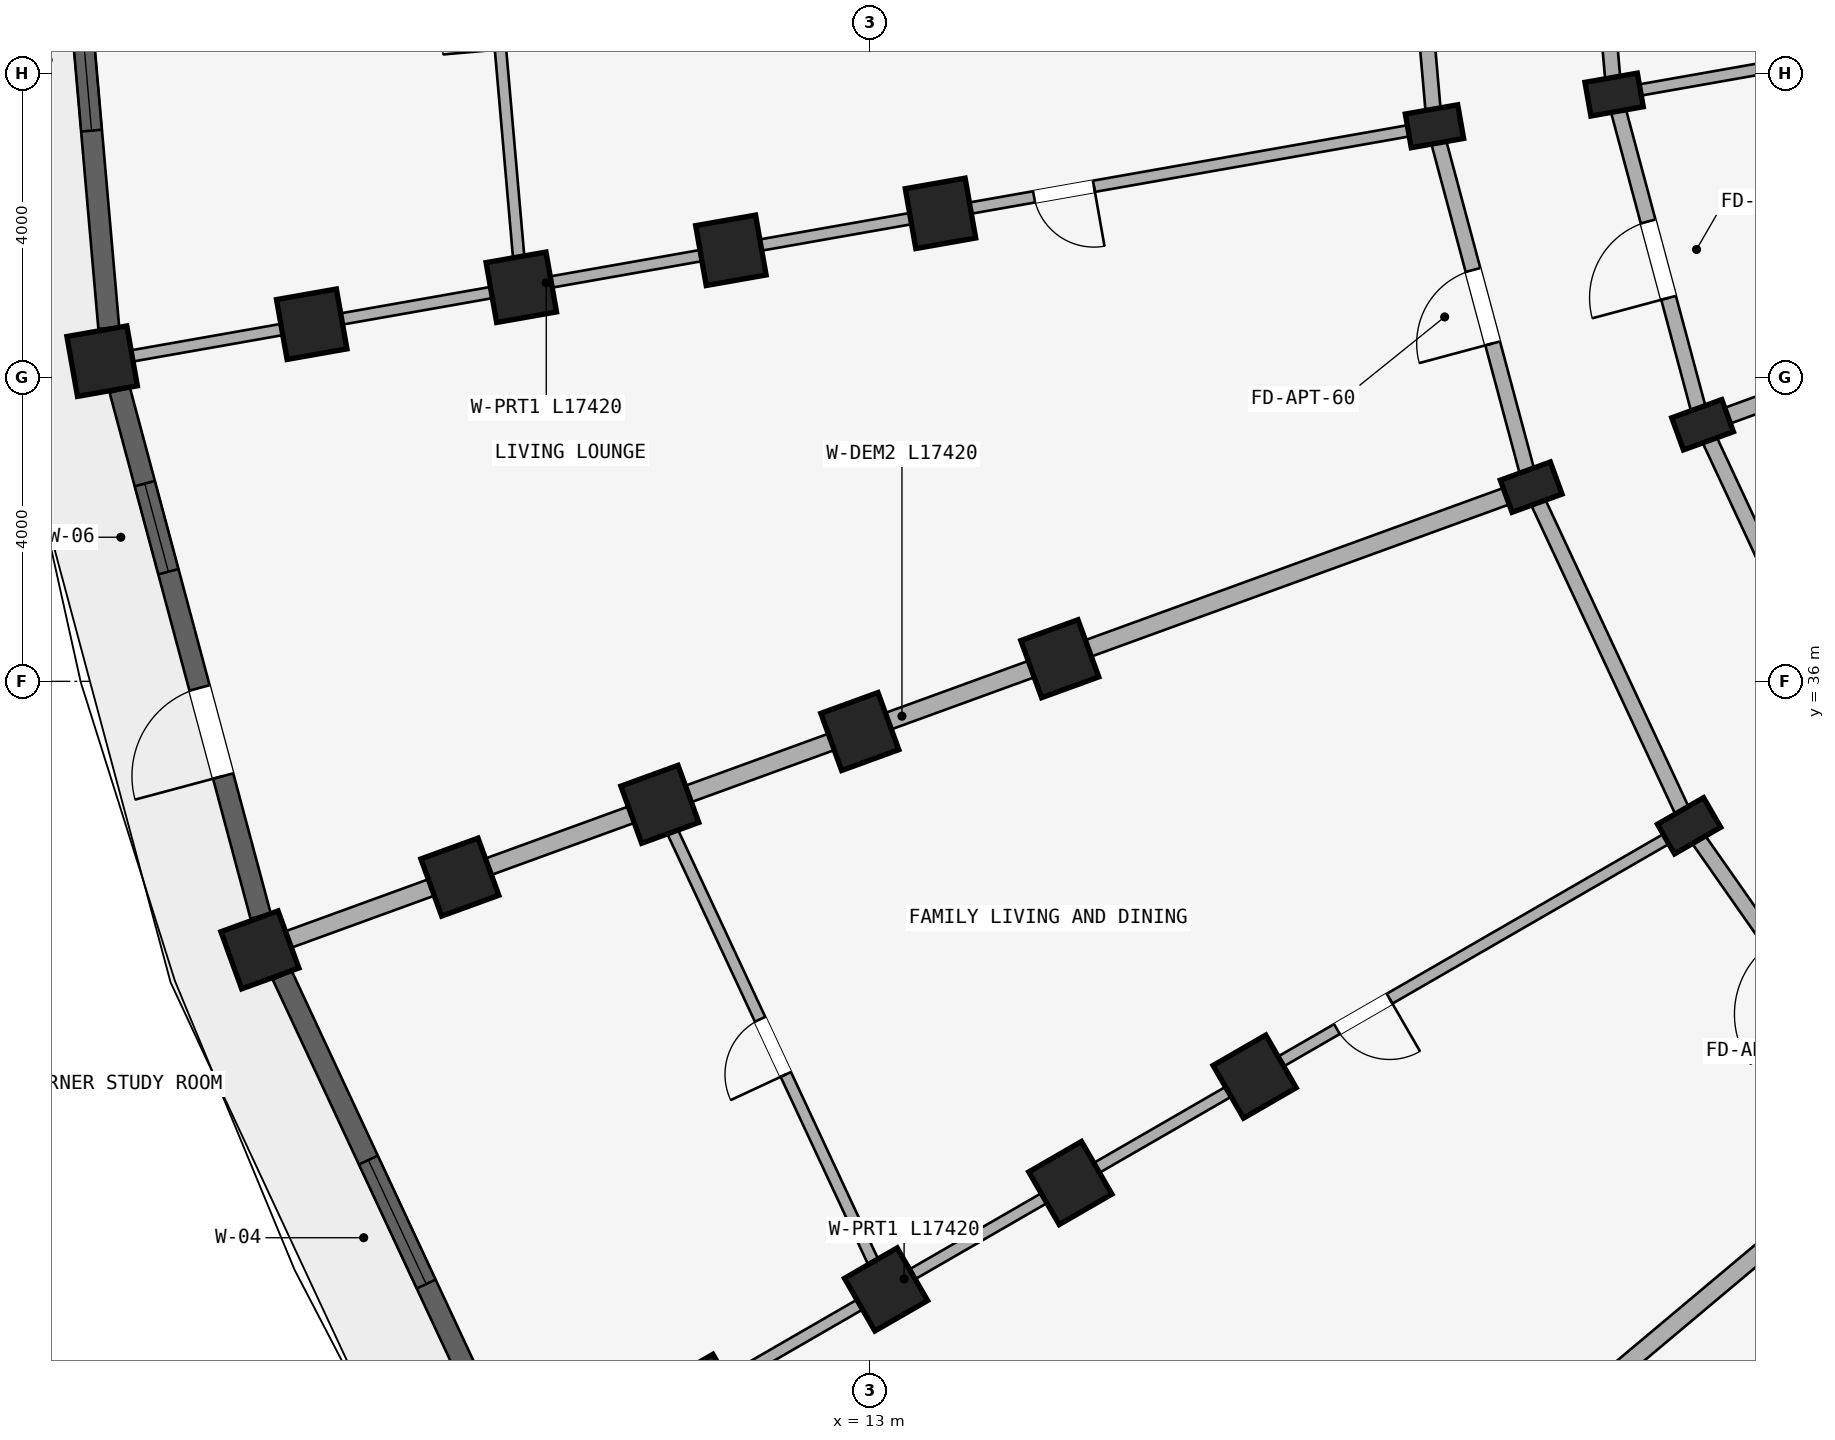
"""IFC4 building model, lengths in metres.
Left out: names, types, materials, properties, quantities, classifications, styles, units other than length and angle.
Written with IfcOpenShell. Run it as: python <this file> out.ifc"""

import sys

from ifc_helpers import new_model, si_unit, direction, frame, frame_2d, origin, origin_2d, place, context, subcontext, project, spatial, rectangle, extrude, element, fill, save


model = new_model("IFC4")
c1 = context("Model", 3, precision=1e-05, world=origin(), true_north=direction((0.0, 1.0)))
c2 = subcontext(c1, "Body", "Model", "MODEL_VIEW")
j1 = project(units=[si_unit("LENGTHUNIT", "METRE"), si_unit("PLANEANGLEUNIT", "RADIAN")], contexts=[c1])
p1 = place(None, origin())
s1 = spatial("IfcSite", under=j1, at=p1, CompositionType="ELEMENT")
p2 = place(p1, origin())
s2 = spatial("IfcBuilding", under=s1, at=p2, CompositionType="ELEMENT")
p3 = place(p2, frame((0.0, 0.0, 11.85)))
s3 = spatial("IfcBuildingStorey", under=s2, at=p3, CompositionType="ELEMENT", Elevation=11.85)
p4 = place(p3, frame((23.778, 34.1, 0.0), z_axis=(0.0, 0.0, 1.0), x_axis=(-0.5, 0.866025403784, 0.0)))
e1 = element("IfcColumn", 1, at=p4, inside=s3, PredefinedType="COLUMN", context=c2, shape_type="SweptSolid", body=[
    extrude(rectangle(XDim=0.45, YDim=0.7, at=origin_2d()), origin(), (0.0, 0.0, 1.0), 2.93),
])
for number, where, z_axis, x_axis in (
    (2, (18.062, 30.8, 0.0), (0.0, 0.0, 1.0), (-0.5, 0.866, 0.0)),
    (3, (15.637, 29.4, 0.0), (0.0, 0.0, 1.0), (-0.5, 0.866, 0.0)),
    (4, (13.213, 28.0, 0.0), (0.0, 0.0, 1.0), (-0.5, 0.866, 0.0)),
    (5, (10.788, 26.6, 0.0), (0.0, 0.0, 1.0), (-0.5, 0.866, 0.0)),
):
    element("IfcColumn", number, at=place(p3, frame(where, z_axis=z_axis, x_axis=x_axis)), inside=s3, PredefinedType="COLUMN", context=c2, shape_type="SweptSolid", body=[
        extrude(rectangle(XDim=0.8, YDim=0.8, at=origin_2d()), origin(), (0.0, 0.0, 1.0), 2.93),
    ])
for number, where, z_axis, x_axis in (
    (6, (23.956, 39.376, 0.0), (0.0, 0.0, 1.0), (-0.342, 0.94, 0.0)),
    (7, (21.701, 38.555, 0.0), (0.0, 0.0, 1.0), (-0.342, 0.94, 0.0)),
):
    element("IfcColumn", number, at=place(p3, frame(where, z_axis=z_axis, x_axis=x_axis)), inside=s3, PredefinedType="COLUMN", context=c2, shape_type="SweptSolid", body=[
        extrude(rectangle(XDim=0.45, YDim=0.7, at=origin_2d()), origin(), (0.0, 0.0, 1.0), 2.93),
    ])
for number, where, z_axis, x_axis in (
    (8, (15.499, 36.298, 0.0), (0.0, 0.0, 1.0), (-0.342, 0.94, 0.0)),
    (9, (12.868, 35.34, 0.0), (0.0, 0.0, 1.0), (-0.342, 0.94, 0.0)),
    (10, (10.236, 34.382, 0.0), (0.0, 0.0, 1.0), (-0.342, 0.94, 0.0)),
    (11, (7.605, 33.425, 0.0), (0.0, 0.0, 1.0), (-0.342, 0.94, 0.0)),
    (12, (4.974, 32.467, 0.0), (0.0, 0.0, 1.0), (-0.342, 0.94, 0.0)),
):
    element("IfcColumn", number, at=place(p3, frame(where, z_axis=z_axis, x_axis=x_axis)), inside=s3, PredefinedType="COLUMN", context=c2, shape_type="SweptSolid", body=[
        extrude(rectangle(XDim=0.8, YDim=0.8, at=origin_2d()), origin(), (0.0, 0.0, 1.0), 2.93),
    ])
for number, where, z_axis, x_axis in (
    (13, (22.792, 43.72, 0.0), (0.0, 0.0, 1.0), (-0.174, 0.985, 0.0)),
    (14, (20.428, 43.303, 0.0), (0.0, 0.0, 1.0), (-0.174, 0.985, 0.0)),
):
    element("IfcColumn", number, at=place(p3, frame(where, z_axis=z_axis, x_axis=x_axis)), inside=s3, PredefinedType="COLUMN", context=c2, shape_type="SweptSolid", body=[
        extrude(rectangle(XDim=0.45, YDim=0.7, at=origin_2d()), origin(), (0.0, 0.0, 1.0), 2.93),
    ])
for number, where, z_axis, x_axis in (
    (15, (13.929, 42.157, 0.0), (0.0, 0.0, 1.0), (-0.174, 0.985, 0.0)),
    (16, (11.171, 41.671, 0.0), (0.0, 0.0, 1.0), (-0.174, 0.985, 0.0)),
    (17, (8.414, 41.185, 0.0), (0.0, 0.0, 1.0), (-0.174, 0.985, 0.0)),
    (18, (5.656, 40.698, 0.0), (0.0, 0.0, 1.0), (-0.174, 0.985, 0.0)),
    (19, (2.899, 40.212, 0.0), (0.0, 0.0, 1.0), (-0.174, 0.985, 0.0)),
):
    element("IfcColumn", number, at=place(p3, frame(where, z_axis=z_axis, x_axis=x_axis)), inside=s3, PredefinedType="COLUMN", context=c2, shape_type="SweptSolid", body=[
        extrude(rectangle(XDim=0.8, YDim=0.8, at=origin_2d()), origin(), (0.0, 0.0, 1.0), 2.93),
    ])
p5 = place(p3, frame((26.598, 30.073, 0.0), z_axis=(0.0, 0.0, 1.0), x_axis=(-0.573592335331, 0.819140911474, 0.0)))
e20 = element("IfcWall", 20, at=p5, inside=s3, PredefinedType="STANDARD", context=c2, shape_type="SweptSolid", body=[
    extrude(rectangle(XDim=4.916, YDim=0.2, at=frame_2d((2.458, 0.0))), origin(), (0.0, 0.0, 1.0), 2.372),
])
p6 = place(p5, frame((1.888, 0.0, 0.0)))
e21 = element("IfcOpeningElement", 21, at=p6, cuts=e20, PredefinedType="OPENING", context=c2, shape_type="SweptSolid", body=[
    extrude(rectangle(XDim=1.14, YDim=2.15, at=frame_2d((0.57, 1.075))), frame((0.0, 0.11, 0.0), z_axis=(0.0, -1.0, 0.0), x_axis=(1.0, 0.0, 0.0)), (0.0, 0.0, 1.0), 0.22),
])
p7 = place(p3, frame((25.856, 35.3, 0.0), z_axis=(0.0, 0.0, 1.0), x_axis=(-0.422617978463, 0.906307919131, 0.0)))
e22 = element("IfcWall", 22, at=p7, inside=s3, PredefinedType="STANDARD", context=c2, shape_type="SweptSolid", body=[
    extrude(rectangle(XDim=4.497, YDim=0.2, at=frame_2d((2.249, 0.0))), origin(), (0.0, 0.0, 1.0), 2.372),
])
p8 = place(p3, frame((23.778, 34.1, 0.0), z_axis=(0.0, 0.0, 1.0), x_axis=(-0.422629854778, 0.906302381024, 0.0)))
e23 = element("IfcWall", 23, at=p8, inside=s3, PredefinedType="STANDARD", context=c2, shape_type="SweptSolid", body=[
    extrude(rectangle(XDim=4.915, YDim=0.2, at=frame_2d((2.458, 0.0))), origin(), (0.0, 0.0, 1.0), 2.372),
])
p9 = place(p3, frame((23.956, 39.376, 0.0), z_axis=(0.0, 0.0, 1.0), x_axis=(-0.258787642463, 0.965934240054, 0.0)))
e24 = element("IfcWall", 24, at=p9, inside=s3, PredefinedType="STANDARD", context=c2, shape_type="SweptSolid", body=[
    extrude(rectangle(XDim=4.497, YDim=0.2, at=frame_2d((2.249, 0.0))), origin(), (0.0, 0.0, 1.0), 2.372),
])
p10 = place(p9, frame((1.729, 0.0, 0.0)))
e25 = element("IfcOpeningElement", 25, at=p10, cuts=e24, PredefinedType="OPENING", context=c2, shape_type="SweptSolid", body=[
    extrude(rectangle(XDim=1.04, YDim=2.15, at=frame_2d((0.52, 1.075))), frame((0.0, 0.11, 0.0), z_axis=(0.0, -1.0, 0.0), x_axis=(1.0, 0.0, 0.0)), (0.0, 0.0, 1.0), 0.22),
])
p11 = place(p3, frame((21.701, 38.555, 0.0), z_axis=(0.0, 0.0, 1.0), x_axis=(-0.258803112091, 0.965930095386, 0.0)))
e26 = element("IfcWall", 26, at=p11, inside=s3, PredefinedType="STANDARD", context=c2, shape_type="SweptSolid", body=[
    extrude(rectangle(XDim=4.916, YDim=0.2, at=frame_2d((2.458, 0.0))), origin(), (0.0, 0.0, 1.0), 2.372),
])
p12 = place(p11, frame((1.958, 0.0, 0.0)))
e27 = element("IfcOpeningElement", 27, at=p12, cuts=e26, PredefinedType="OPENING", context=c2, shape_type="SweptSolid", body=[
    extrude(rectangle(XDim=1.0, YDim=2.15, at=frame_2d((0.5, 1.075))), frame((0.0, 0.11, 0.0), z_axis=(0.0, -1.0, 0.0), x_axis=(1.0, 0.0, 0.0)), (0.0, 0.0, 1.0), 0.22),
])
p13 = place(p3, frame((22.792, 43.72, 0.0), z_axis=(0.0, 0.0, 1.0), x_axis=(-0.087187153726, 0.996191949488, 0.0)))
e28 = element("IfcWall", 28, at=p13, inside=s3, PredefinedType="STANDARD", context=c2, shape_type="SweptSolid", body=[
    extrude(rectangle(XDim=4.497, YDim=0.2, at=frame_2d((2.249, 0.0))), origin(), (0.0, 0.0, 1.0), 2.372),
])
p14 = place(p3, frame((20.428, 43.303, 0.0), z_axis=(0.0, 0.0, 1.0), x_axis=(-0.087167566415, 0.996193663584, 0.0)))
e29 = element("IfcWall", 29, at=p14, inside=s3, PredefinedType="STANDARD", context=c2, shape_type="SweptSolid", body=[
    extrude(rectangle(XDim=4.916, YDim=0.2, at=frame_2d((2.458, 0.0))), origin(), (0.0, 0.0, 1.0), 2.372),
])
p15 = place(p3, frame((26.521, 30.009, 0.0), z_axis=(0.0, 0.0, 1.0), x_axis=(-0.766046835987, -0.642784757967, 0.0)))
e30 = element("IfcWall", 30, at=p15, inside=s3, PredefinedType="STANDARD", context=c2, shape_type="SweptSolid", body=[
    extrude(rectangle(XDim=17.42, YDim=0.23, at=frame_2d((8.71, 0.0))), origin(), (0.0, 0.0, 1.0), 2.372),
])
p16 = place(p3, frame((23.691, 34.05, 0.0), z_axis=(0.0, 0.0, 1.0), x_axis=(-0.866026648973, -0.499997843263, 0.0)))
e31 = element("IfcWall", 31, at=p16, inside=s3, PredefinedType="PARTITIONING", context=c2, shape_type="SweptSolid", body=[
    extrude(rectangle(XDim=17.42, YDim=0.15, at=frame_2d((8.71, 0.0))), origin(), (0.0, 0.0, 1.0), 2.372),
])
p17 = place(p16, frame((4.45, 0.0, 0.0)))
e32 = element("IfcOpeningElement", 32, at=p17, cuts=e31, PredefinedType="OPENING", context=c2, shape_type="SweptSolid", body=[
    extrude(rectangle(XDim=0.8, YDim=2.1, at=frame_2d((0.4, 1.05))), frame((0.0, 0.085, 0.0), z_axis=(0.0, -1.0, 0.0), x_axis=(1.0, 0.0, 0.0)), (0.0, 0.0, 1.0), 0.17),
])
p18 = place(p3, frame((30.346, 41.702, 0.0), z_axis=(0.0, 0.0, 1.0), x_axis=(-0.939696231917, -0.342010221662, 0.0)))
e33 = element("IfcWall", 33, at=p18, inside=s3, PredefinedType="STANDARD", context=c2, shape_type="SweptSolid", body=[
    extrude(rectangle(XDim=6.75, YDim=0.22, at=frame_2d((3.375, 0.0))), origin(), (0.0, 0.0, 1.0), 2.372),
])
p19 = place(p3, frame((21.607, 38.521, 0.0), z_axis=(0.0, 0.0, 1.0), x_axis=(-0.939691901159, -0.342022120477, 0.0)))
e34 = element("IfcWall", 34, at=p19, inside=s3, PredefinedType="STANDARD", context=c2, shape_type="SweptSolid", body=[
    extrude(rectangle(XDim=17.42, YDim=0.23, at=frame_2d((8.71, 0.0))), origin(), (0.0, 0.0, 1.0), 2.372),
])
p20 = place(p3, frame((29.489, 44.901, 0.0), z_axis=(0.0, 0.0, 1.0), x_axis=(-0.984807944945, -0.173647089161, 0.0)))
e35 = element("IfcWall", 35, at=p20, inside=s3, PredefinedType="PARTITIONING", context=c2, shape_type="SweptSolid", body=[
    extrude(rectangle(XDim=6.75, YDim=0.15, at=frame_2d((3.375, 0.0))), origin(), (0.0, 0.0, 1.0), 2.372),
])
p21 = place(p20, frame((3.262, 0.0, 0.0)))
e36 = element("IfcOpeningElement", 36, at=p21, cuts=e35, PredefinedType="OPENING", context=c2, shape_type="SweptSolid", body=[
    extrude(rectangle(XDim=0.9, YDim=2.1, at=frame_2d((0.45, 1.05))), frame((0.0, 0.085, 0.0), z_axis=(0.0, -1.0, 0.0), x_axis=(1.0, 0.0, 0.0)), (0.0, 0.0, 1.0), 0.17),
])
p22 = place(p3, frame((20.33, 43.286, 0.0), z_axis=(0.0, 0.0, 1.0), x_axis=(-0.984808098809, -0.173646216546, 0.0)))
e37 = element("IfcWall", 37, at=p22, inside=s3, PredefinedType="PARTITIONING", context=c2, shape_type="SweptSolid", body=[
    extrude(rectangle(XDim=17.42, YDim=0.15, at=frame_2d((8.71, 0.0))), origin(), (0.0, 0.0, 1.0), 2.372),
])
p23 = place(p22, frame((4.45, 0.0, 0.0)))
e38 = element("IfcOpeningElement", 38, at=p23, cuts=e37, PredefinedType="OPENING", context=c2, shape_type="SweptSolid", body=[
    extrude(rectangle(XDim=0.8, YDim=2.1, at=frame_2d((0.4, 1.05))), frame((0.0, 0.085, 0.0), z_axis=(0.0, -1.0, 0.0), x_axis=(1.0, 0.0, 0.0)), (0.0, 0.0, 1.0), 0.17),
])
p24 = place(p3, frame((13.213, 28.0, 0.0), z_axis=(0.0, 0.0, 1.0), x_axis=(-0.422640621205, 0.906297360311, 0.0)))
e39 = element("IfcWall", 39, at=p24, inside=s3, PredefinedType="PLUMBINGWALL", context=c2, shape_type="SweptSolid", body=[
    extrude(rectangle(XDim=7.042, YDim=0.15, at=frame_2d((3.521, 0.0))), origin(), (0.0, 0.0, 1.0), 2.372),
])
p25 = place(p24, frame((3.121, 0.0, 0.0)))
e40 = element("IfcOpeningElement", 40, at=p25, cuts=e39, PredefinedType="OPENING", context=c2, shape_type="SweptSolid", body=[
    extrude(rectangle(XDim=0.8, YDim=2.1, at=frame_2d((0.4, 1.05))), frame((0.0, 0.085, 0.0), z_axis=(0.0, -1.0, 0.0), x_axis=(1.0, 0.0, 0.0)), (0.0, 0.0, 1.0), 0.17),
])
p26 = place(p3, frame((8.414, 41.185, 0.0), z_axis=(0.0, 0.0, 1.0), x_axis=(-0.087156198737, 0.996194658198, 0.0)))
e41 = element("IfcWall", 41, at=p26, inside=s3, PredefinedType="PLUMBINGWALL", context=c2, shape_type="SweptSolid", body=[
    extrude(rectangle(XDim=7.042, YDim=0.15, at=frame_2d((3.521, 0.0))), origin(), (0.0, 0.0, 1.0), 2.372),
])
p27 = place(p26, frame((3.141, 0.0, 0.0)))
e42 = element("IfcOpeningElement", 42, at=p27, cuts=e41, PredefinedType="OPENING", context=c2, shape_type="SweptSolid", body=[
    extrude(rectangle(XDim=0.76, YDim=2.05, at=frame_2d((0.38, 1.025))), frame((0.0, 0.085, 0.0), z_axis=(0.0, -1.0, 0.0), x_axis=(1.0, 0.0, 0.0)), (0.0, 0.0, 1.0), 0.17),
])
p28 = place(p3, frame((8.296, 25.64, 0.0), z_axis=(0.0, 0.0, 1.0), x_axis=(-0.422633596215, 0.906300636296, 0.0)))
e43 = element("IfcWall", 43, at=p28, inside=s3, PredefinedType="STANDARD", context=c2, shape_type="SweptSolid", body=[
    extrude(rectangle(XDim=7.164, YDim=0.275, at=frame_2d((3.582, 0.0))), origin(), (0.0, 0.0, 1.0), 2.372),
])
p29 = place(p28, frame((2.682, 0.0, 0.522)))
e44 = element("IfcOpeningElement", 44, at=p29, cuts=e43, PredefinedType="OPENING", context=c2, shape_type="SweptSolid", body=[
    extrude(rectangle(XDim=1.8, YDim=1.65, at=frame_2d((0.9, 0.825))), frame((0.0, 0.147, 0.0), z_axis=(0.0, -1.0, 0.0), x_axis=(1.0, 0.0, 0.0)), (0.0, 0.0, 1.0), 0.295),
])
p30 = place(p3, frame((4.984, 32.912, 0.0), z_axis=(0.0, 0.0, 1.0), x_axis=(-0.258826933296, 0.965923712619, 0.0)))
e45 = element("IfcWall", 45, at=p30, inside=s3, PredefinedType="STANDARD", context=c2, shape_type="SweptSolid", body=[
    extrude(rectangle(XDim=7.164, YDim=0.275, at=frame_2d((3.582, 0.0))), origin(), (0.0, 0.0, 1.0), 2.372),
])
p31 = place(p30, frame((4.69, 0.0, 0.372)))
e46 = element("IfcOpeningElement", 46, at=p31, cuts=e45, PredefinedType="OPENING", context=c2, shape_type="SweptSolid", body=[
    extrude(rectangle(XDim=1.2, YDim=1.5, at=frame_2d((0.6, 0.75))), frame((0.0, 0.147, 0.0), z_axis=(0.0, -1.0, 0.0), x_axis=(1.0, 0.0, 0.0)), (0.0, 0.0, 1.0), 0.295),
])
p32 = place(p30, frame((1.907, 0.0, 0.0)))
e47 = element("IfcOpeningElement", 47, at=p32, cuts=e45, PredefinedType="OPENING", context=c2, shape_type="SweptSolid", body=[
    extrude(rectangle(XDim=1.2, YDim=2.15, at=frame_2d((0.6, 1.075))), frame((0.0, 0.147, 0.0), z_axis=(0.0, -1.0, 0.0), x_axis=(1.0, 0.0, 0.0)), (0.0, 0.0, 1.0), 0.295),
])
p33 = place(p3, frame((2.986, 40.649, 0.0), z_axis=(0.0, 0.0, 1.0), x_axis=(-0.08713989423, 0.99619608453, 0.0)))
e48 = element("IfcWall", 48, at=p33, inside=s3, PredefinedType="STANDARD", context=c2, shape_type="SweptSolid", body=[
    extrude(rectangle(XDim=7.164, YDim=0.275, at=frame_2d((3.582, 0.0))), origin(), (0.0, 0.0, 1.0), 2.372),
])
p34 = place(p33, frame((2.607, 0.0, 0.322)))
e49 = element("IfcOpeningElement", 49, at=p34, cuts=e48, PredefinedType="OPENING", context=c2, shape_type="SweptSolid", body=[
    extrude(rectangle(XDim=1.95, YDim=1.85, at=frame_2d((0.975, 0.925))), frame((0.0, 0.147, 0.0), z_axis=(0.0, -1.0, 0.0), x_axis=(1.0, 0.0, 0.0)), (0.0, 0.0, 1.0), 0.295),
])
p35 = place(p29, origin())
e50 = element("IfcWindow", 50, at=p35, inside=s3, PartitioningType="DOUBLE_PANEL_VERTICAL", PredefinedType="WINDOW", context=c2, shape_type="SweptSolid", body=[
    extrude(rectangle(XDim=1.8, YDim=1.65, at=frame_2d((0.9, 0.825))), frame((0.0, 0.03, 0.0), z_axis=(0.0, -1.0, 0.0), x_axis=(1.0, 0.0, 0.0)), (0.0, 0.0, 1.0), 0.06),
])
fill(e44, e50)
p36 = place(p31, origin())
e51 = element("IfcWindow", 51, at=p36, inside=s3, PartitioningType="SINGLE_PANEL", PredefinedType="WINDOW", context=c2, shape_type="SweptSolid", body=[
    extrude(rectangle(XDim=1.2, YDim=1.5, at=frame_2d((0.6, 0.75))), frame((0.0, 0.03, 0.0), z_axis=(0.0, -1.0, 0.0), x_axis=(1.0, 0.0, 0.0)), (0.0, 0.0, 1.0), 0.06),
])
fill(e46, e51)
p37 = place(p34, origin())
e52 = element("IfcWindow", 52, at=p37, inside=s3, PartitioningType="DOUBLE_PANEL_VERTICAL", PredefinedType="WINDOW", context=c2, shape_type="SweptSolid", body=[
    extrude(rectangle(XDim=1.95, YDim=1.85, at=frame_2d((0.975, 0.925))), frame((0.0, 0.03, 0.0), z_axis=(0.0, -1.0, 0.0), x_axis=(1.0, 0.0, 0.0)), (0.0, 0.0, 1.0), 0.06),
])
fill(e49, e52)
p38 = place(p17, frame((0.8, 0.0, 0.0), z_axis=(0.0, 0.0, 1.0), x_axis=(-1.0, 0.0, 0.0)))
e53 = element("IfcDoor", 53, at=p38, inside=s3, OperationType="SINGLE_SWING_RIGHT", PredefinedType="DOOR", context=c2, shape_type="SweptSolid", body=[
    extrude(rectangle(XDim=0.8, YDim=2.1, at=frame_2d((0.4, 1.05))), frame((0.0, 0.025, 0.0), z_axis=(0.0, -1.0, 0.0), x_axis=(1.0, 0.0, 0.0)), (0.0, 0.0, 1.0), 0.05),
])
fill(e32, e53)
p39 = place(p23, frame((0.8, 0.0, 0.0), z_axis=(0.0, 0.0, 1.0), x_axis=(-1.0, 0.0, 0.0)))
e54 = element("IfcDoor", 54, at=p39, inside=s3, OperationType="SINGLE_SWING_RIGHT", PredefinedType="DOOR", context=c2, shape_type="SweptSolid", body=[
    extrude(rectangle(XDim=0.8, YDim=2.1, at=frame_2d((0.4, 1.05))), frame((0.0, 0.025, 0.0), z_axis=(0.0, -1.0, 0.0), x_axis=(1.0, 0.0, 0.0)), (0.0, 0.0, 1.0), 0.05),
])
fill(e38, e54)
p40 = place(p25, origin())
e55 = element("IfcDoor", 55, at=p40, inside=s3, OperationType="SINGLE_SWING_LEFT", PredefinedType="DOOR", context=c2, shape_type="SweptSolid", body=[
    extrude(rectangle(XDim=0.8, YDim=2.1, at=frame_2d((0.4, 1.05))), frame((0.0, 0.025, 0.0), z_axis=(0.0, -1.0, 0.0), x_axis=(1.0, 0.0, 0.0)), (0.0, 0.0, 1.0), 0.05),
])
fill(e40, e55)
p41 = place(p12, frame((1.0, 0.0, 0.0), z_axis=(0.0, 0.0, 1.0), x_axis=(-1.0, 0.0, 0.0)))
e56 = element("IfcDoor", 56, at=p41, inside=s3, OperationType="SINGLE_SWING_RIGHT", PredefinedType="DOOR", context=c2, shape_type="SweptSolid", body=[
    extrude(rectangle(XDim=1.0, YDim=2.15, at=frame_2d((0.5, 1.075))), frame((0.0, 0.025, 0.0), z_axis=(0.0, -1.0, 0.0), x_axis=(1.0, 0.0, 0.0)), (0.0, 0.0, 1.0), 0.05),
])
fill(e27, e56)
p42 = place(p10, origin())
e57 = element("IfcDoor", 57, at=p42, inside=s3, OperationType="SINGLE_SWING_LEFT", PredefinedType="DOOR", context=c2, shape_type="SweptSolid", body=[
    extrude(rectangle(XDim=1.04, YDim=2.15, at=frame_2d((0.52, 1.075))), frame((0.0, 0.025, 0.0), z_axis=(0.0, -1.0, 0.0), x_axis=(1.0, 0.0, 0.0)), (0.0, 0.0, 1.0), 0.05),
])
fill(e25, e57)
p43 = place(p32, origin())
e58 = element("IfcDoor", 58, at=p43, inside=s3, OperationType="SINGLE_SWING_LEFT", PredefinedType="DOOR", context=c2, shape_type="SweptSolid", body=[
    extrude(rectangle(XDim=1.2, YDim=2.15, at=frame_2d((0.6, 1.075))), frame((0.0, 0.025, 0.0), z_axis=(0.0, -1.0, 0.0), x_axis=(1.0, 0.0, 0.0)), (0.0, 0.0, 1.0), 0.05),
])
fill(e47, e58)
save(model, sys.argv[1])
